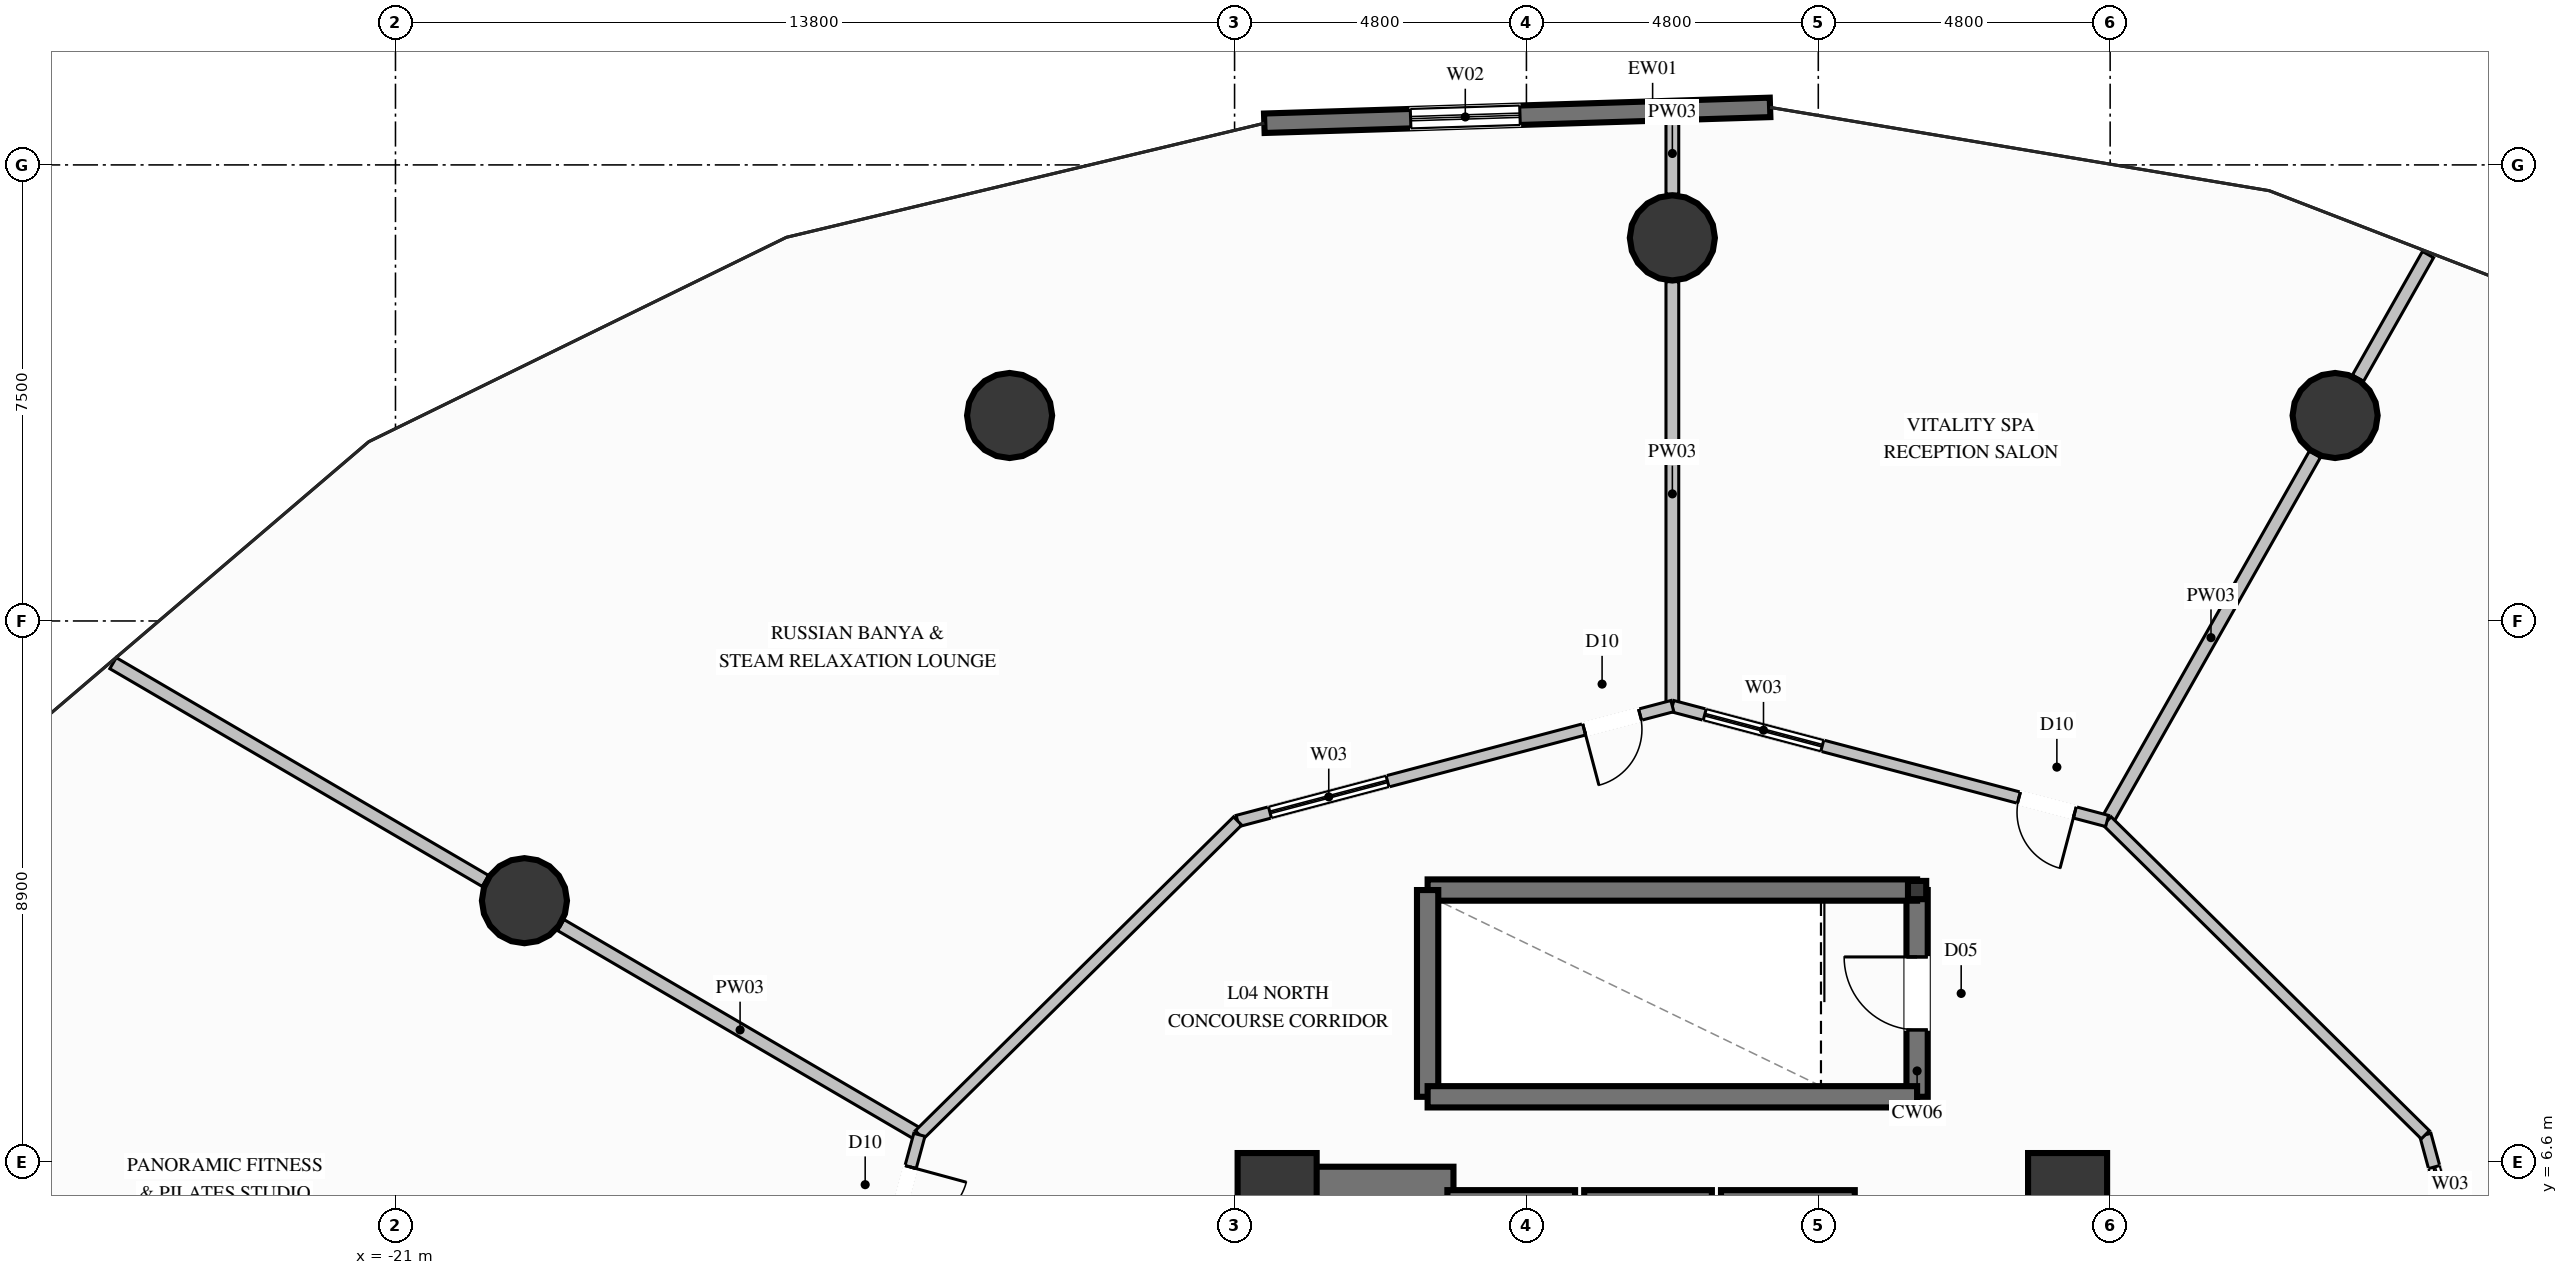
"""IFC4 building model, lengths in metres.
Left out: names, types, materials, properties, quantities, classifications, styles, units other than length and angle.
Written with IfcOpenShell. Run it as: python <this file> out.ifc"""

import sys

from ifc_helpers import new_model, si_unit, direction, frame, frame_2d, origin, origin_2d, place, context, subcontext, project, spatial, rectangle, hollow_rectangle, circle, extrude, element, fill, save


model = new_model("IFC4")
c1 = context("Model", 3, precision=1e-05, world=origin(), true_north=direction((0.0, 1.0)))
c2 = subcontext(c1, "Body", "Model", "MODEL_VIEW")
j1 = project(units=[si_unit("LENGTHUNIT", "METRE"), si_unit("PLANEANGLEUNIT", "RADIAN")], contexts=[c1])
p1 = place(None, origin())
s1 = spatial("IfcSite", under=j1, at=p1, CompositionType="ELEMENT")
p2 = place(p1, origin())
s2 = spatial("IfcBuilding", under=s1, at=p2, CompositionType="ELEMENT")
p3 = place(p2, frame((0.0, 0.0, 23.6)))
s3 = spatial("IfcBuildingStorey", under=s2, at=p3, CompositionType="ELEMENT", Elevation=23.6)
for number, where, z_axis, x_axis in (
    (1, (6.5, 6.1, 0.0), (0.0, 0.0, 1.0), (1.0, 0.0, 0.0)),
    (2, (-6.5, 6.1, 0.0), (0.0, 0.0, 1.0), (1.0, 0.0, 0.0)),
):
    element("IfcColumn", number, at=place(p3, frame(where, z_axis=z_axis, x_axis=x_axis)), inside=s3, PredefinedType="COLUMN", context=c2, shape_type="SweptSolid", body=[
        extrude(rectangle(XDim=1.3, YDim=1.3, at=origin_2d()), origin(), (0.0, 0.0, 1.0), 4.8),
    ])
p4 = place(p3, frame((-6.075, 6.1, 0.0), z_axis=(0.0, 0.0, 1.0), x_axis=(1.0, 0.0, 0.0)))
e3 = element("IfcWall", 3, at=p4, inside=s3, PredefinedType="SHEAR", context=c2, shape_type="SweptSolid", body=[
    extrude(rectangle(XDim=2.475, YDim=0.85, at=frame_2d((1.237, 0.0))), origin(), (0.0, 0.0, 1.0), 4.8),
])
p5 = place(p3, frame((5.85, 6.1, 0.0), z_axis=(0.0, 0.0, 1.0), x_axis=(1.0, 0.0, 0.0)))
e4 = element("IfcWall", 4, at=p5, inside=s3, PredefinedType="SHEAR", context=c2, shape_type="SweptSolid", body=[
    extrude(rectangle(XDim=0.225, YDim=0.85, at=frame_2d((0.112, 0.0))), origin(), (0.0, 0.0, 1.0), 4.8),
])
p6 = place(p3, frame((-6.5, 2.35, 0.0), z_axis=(0.0, 0.0, 1.0), x_axis=(0.0, 1.0, 0.0)))
e5 = element("IfcWall", 5, at=p6, inside=s3, PredefinedType="SHEAR", context=c2, shape_type="SweptSolid", body=[
    extrude(rectangle(XDim=4.175, YDim=0.85, at=frame_2d((2.087, 0.0))), origin(), (0.0, 0.0, 1.0), 4.8),
])
p7 = place(p3, frame((6.5, 3.35, 0.0), z_axis=(0.0, 0.0, 1.0), x_axis=(0.0, 1.0, 0.0)))
e6 = element("IfcWall", 6, at=p7, inside=s3, PredefinedType="SHEAR", context=c2, shape_type="SweptSolid", body=[
    extrude(rectangle(XDim=3.175, YDim=0.85, at=frame_2d((1.587, 0.0))), origin(), (0.0, 0.0, 1.0), 4.8),
])
p8 = place(p3, frame((4.025, 11.075, 0.0), z_axis=(0.0, 0.0, 1.0), x_axis=(1.0, 0.0, 0.0)))
e7 = element("IfcColumn", 7, at=p8, inside=s3, PredefinedType="COLUMN", context=c2, shape_type="SweptSolid", body=[
    extrude(hollow_rectangle(XDim=0.3, YDim=0.3, WallThickness=0.016, at=origin_2d()), origin(), (0.0, 0.0, 1.0), 4.8),
])
for number, where, z_axis, x_axis in (
    (8, (10.9, 18.879, 0.0), (0.0, 0.0, 1.0), (1.0, 0.0, 0.0)),
    (9, (0.0, 21.8, 0.0), (0.0, 0.0, 1.0), (1.0, 0.0, 0.0)),
    (10, (-10.9, 18.879, 0.0), (0.0, 0.0, 1.0), (1.0, 0.0, 0.0)),
    (11, (-18.879, 10.9, 0.0), (0.0, 0.0, 1.0), (1.0, 0.0, 0.0)),
):
    element("IfcColumn", number, at=place(p3, frame(where, z_axis=z_axis, x_axis=x_axis)), inside=s3, PredefinedType="COLUMN", context=c2, shape_type="SweptSolid", body=[
        extrude(circle(Radius=0.7, at=origin_2d()), origin(), (0.0, 0.0, 1.0), 4.8),
    ])
p9 = place(p3, frame((-6.711, 23.685, 0.0), z_axis=(0.0, 0.0, 1.0), x_axis=(0.999508118347, 0.031361144071, 0.0)))
e12 = element("IfcWall", 12, at=p9, inside=s3, PredefinedType="SOLIDWALL", context=c2, shape_type="SweptSolid", body=[
    extrude(rectangle(XDim=8.322, YDim=0.32, at=frame_2d((4.161, 0.0))), origin(), (0.0, 0.0, 1.0), 4.54),
])
p10 = place(p9, frame((2.407, 0.0, 0.65)))
e13 = element("IfcOpeningElement", 13, at=p10, cuts=e12, PredefinedType="OPENING", context=c2, shape_type="SweptSolid", body=[
    extrude(rectangle(XDim=1.8, YDim=2.6, at=frame_2d((0.9, 1.3))), frame((0.0, 0.17, 0.0), z_axis=(0.0, -1.0, 0.0), x_axis=(1.0, 0.0, 0.0)), (0.0, 0.0, 1.0), 0.34),
])
for number, where, z_axis, x_axis in (
    (14, (-1.6, 6.0, 0.0), (0.0, 0.0, 1.0), (-1.0, 0.0, 0.0)),
    (15, (0.65, 6.0, 0.0), (0.0, 0.0, 1.0), (-1.0, 0.0, 0.0)),
):
    element("IfcWall", number, at=place(p3, frame(where, z_axis=z_axis, x_axis=x_axis)), inside=s3, PredefinedType="SOLIDWALL", context=c2, shape_type="SweptSolid", body=[
        extrude(rectangle(XDim=2.1, YDim=0.28, at=frame_2d((1.05, 0.0))), origin(), (0.0, 0.0, 1.0), 4.54),
    ])
p11 = place(p3, frame((3.0, 6.0, 0.0), z_axis=(0.0, 0.0, 1.0), x_axis=(-1.0, 0.0, 0.0)))
e16 = element("IfcWall", 16, at=p11, inside=s3, PredefinedType="SOLIDWALL", context=c2, shape_type="SweptSolid", body=[
    extrude(rectangle(XDim=2.2, YDim=0.28, at=frame_2d((1.1, 0.0))), origin(), (0.0, 0.0, 1.0), 4.54),
])
p12 = place(p3, frame((4.025, 7.675, 0.0), z_axis=(0.0, 0.0, 1.0), x_axis=(0.0, 1.0, 0.0)))
e17 = element("IfcWall", 17, at=p12, inside=s3, PredefinedType="SOLIDWALL", context=c2, shape_type="SweptSolid", body=[
    extrude(rectangle(XDim=3.4, YDim=0.35, at=frame_2d((1.7, 0.0))), origin(), (0.0, 0.0, 1.0), 4.54),
])
p13 = place(p12, frame((1.1, 0.0, 0.0)))
e18 = element("IfcOpeningElement", 18, at=p13, cuts=e17, PredefinedType="OPENING", context=c2, shape_type="SweptSolid", body=[
    extrude(rectangle(XDim=1.2, YDim=2.2, at=frame_2d((0.6, 1.1))), frame((0.0, 0.185, 0.0), z_axis=(0.0, -1.0, 0.0), x_axis=(1.0, 0.0, 0.0)), (0.0, 0.0, 1.0), 0.37),
])
p14 = place(p3, frame((4.025, 11.075, 0.0), z_axis=(0.0, 0.0, 1.0), x_axis=(-1.0, 0.0, 0.0)))
e19 = element("IfcWall", 19, at=p14, inside=s3, PredefinedType="SOLIDWALL", context=c2, shape_type="SweptSolid", body=[
    extrude(rectangle(XDim=8.05, YDim=0.35, at=frame_2d((4.025, 0.0))), origin(), (0.0, 0.0, 1.0), 4.54),
])
p15 = place(p3, frame((-4.025, 11.075, 0.0), z_axis=(0.0, 0.0, 1.0), x_axis=(0.0, -1.0, 0.0)))
e20 = element("IfcWall", 20, at=p15, inside=s3, PredefinedType="SOLIDWALL", context=c2, shape_type="SweptSolid", body=[
    extrude(rectangle(XDim=3.4, YDim=0.35, at=frame_2d((1.7, 0.0))), origin(), (0.0, 0.0, 1.0), 4.54),
])
p16 = place(p3, frame((-4.025, 7.675, 0.0), z_axis=(0.0, 0.0, 1.0), x_axis=(1.0, 0.0, 0.0)))
e21 = element("IfcWall", 21, at=p16, inside=s3, PredefinedType="SOLIDWALL", context=c2, shape_type="SweptSolid", body=[
    extrude(rectangle(XDim=8.05, YDim=0.35, at=frame_2d((4.025, 0.0))), origin(), (0.0, 0.0, 1.0), 4.54),
])
p17 = place(p3, frame((7.15, 12.211, 0.0), z_axis=(0.0, 0.0, 1.0), x_axis=(0.493009905658, 0.87002369676, 0.0)))
e22 = element("IfcWall", 22, at=p17, inside=s3, PredefinedType="PARTITIONING", context=c2, shape_type="SweptSolid", body=[
    extrude(rectangle(XDim=6.931, YDim=0.21, at=frame_2d((3.465, 0.0))), origin(), (0.0, 0.0, 1.0), 2.725),
])
p18 = place(p3, frame((11.276, 19.493, 0.0), z_axis=(0.0, 0.0, 1.0), x_axis=(0.493041569547, 0.870005753256, 0.0)))
e23 = element("IfcWall", 23, at=p18, inside=s3, PredefinedType="PARTITIONING", context=c2, shape_type="SweptSolid", body=[
    extrude(rectangle(XDim=2.337, YDim=0.21, at=frame_2d((1.168, 0.0))), origin(), (0.0, 0.0, 1.0), 4.54),
])
p19 = place(p3, frame((0.0, 14.1, 0.0), z_axis=(0.0, 0.0, 1.0), x_axis=(0.0, 1.0, 0.0)))
e24 = element("IfcWall", 24, at=p19, inside=s3, PredefinedType="PARTITIONING", context=c2, shape_type="SweptSolid", body=[
    extrude(rectangle(XDim=6.98, YDim=0.21, at=frame_2d((3.49, 0.0))), origin(), (0.0, 0.0, 1.0), 2.725),
])
p20 = place(p3, frame((0.0, 22.52, 0.0), z_axis=(0.0, 0.0, 1.0), x_axis=(0.0, 1.0, 0.0)))
e25 = element("IfcWall", 25, at=p20, inside=s3, PredefinedType="PARTITIONING", context=c2, shape_type="SweptSolid", body=[
    extrude(rectangle(XDim=1.336, YDim=0.21, at=frame_2d((0.668, 0.0))), origin(), (0.0, 0.0, 1.0), 4.54),
])
p21 = place(p3, frame((-12.384, 7.05, 0.0), z_axis=(0.0, 0.0, 1.0), x_axis=(-0.863200238908, 0.504861711313, 0.0)))
e26 = element("IfcWall", 26, at=p21, inside=s3, PredefinedType="PARTITIONING", context=c2, shape_type="SweptSolid", body=[
    extrude(rectangle(XDim=6.832, YDim=0.21, at=frame_2d((3.416, 0.0))), origin(), (0.0, 0.0, 1.0), 2.725),
])
p22 = place(p3, frame((-19.522, 11.225, 0.0), z_axis=(0.0, 0.0, 1.0), x_axis=(-0.863224110389, 0.504820894222, 0.0)))
e27 = element("IfcWall", 27, at=p22, inside=s3, PredefinedType="PARTITIONING", context=c2, shape_type="SweptSolid", body=[
    extrude(rectangle(XDim=7.093, YDim=0.21, at=frame_2d((3.547, 0.0))), origin(), (0.0, 0.0, 1.0), 4.54),
])
p23 = place(p3, frame((14.3, 0.0, 0.0), z_axis=(0.0, 0.0, 1.0), x_axis=(-0.262260528785, 0.964997106235, 0.0)))
e28 = element("IfcWall", 28, at=p23, inside=s3, PredefinedType="PARTITIONING", context=c2, shape_type="SweptSolid", body=[
    extrude(rectangle(XDim=7.306, YDim=0.19, at=frame_2d((3.653, 0.0))), origin(), (0.0, 0.0, 1.0), 4.54),
])
p24 = place(p23, frame((0.55, 0.0, 0.0)))
e29 = element("IfcOpeningElement", 29, at=p24, cuts=e28, PredefinedType="OPENING", context=c2, shape_type="SweptSolid", body=[
    extrude(rectangle(XDim=0.95, YDim=2.1, at=frame_2d((0.475, 1.05))), frame((0.0, 0.105, 0.0), z_axis=(0.0, -1.0, 0.0), x_axis=(1.0, 0.0, 0.0)), (0.0, 0.0, 1.0), 0.21),
])
p25 = place(p23, frame((4.756, 0.0, 0.9)))
e30 = element("IfcOpeningElement", 30, at=p25, cuts=e28, PredefinedType="OPENING", context=c2, shape_type="SweptSolid", body=[
    extrude(rectangle(XDim=2.0, YDim=1.6, at=frame_2d((1.0, 0.8))), frame((0.0, 0.105, 0.0), z_axis=(0.0, -1.0, 0.0), x_axis=(1.0, 0.0, 0.0)), (0.0, 0.0, 1.0), 0.21),
])
p26 = place(p3, frame((12.384, 7.05, 0.0), z_axis=(0.0, 0.0, 1.0), x_axis=(-0.712071304345, 0.702107155303, 0.0)))
e31 = element("IfcWall", 31, at=p26, inside=s3, PredefinedType="PARTITIONING", context=c2, shape_type="SweptSolid", body=[
    extrude(rectangle(XDim=7.351, YDim=0.19, at=frame_2d((3.675, 0.0))), origin(), (0.0, 0.0, 1.0), 4.54),
])
p27 = place(p3, frame((7.15, 12.211, 0.0), z_axis=(0.0, 0.0, 1.0), x_axis=(-0.966820901533, 0.255455170937, 0.0)))
e32 = element("IfcWall", 32, at=p27, inside=s3, PredefinedType="PARTITIONING", context=c2, shape_type="SweptSolid", body=[
    extrude(rectangle(XDim=7.395, YDim=0.19, at=frame_2d((3.698, 0.0))), origin(), (0.0, 0.0, 1.0), 4.54),
])
p28 = place(p27, frame((0.55, 0.0, 0.0)))
e33 = element("IfcOpeningElement", 33, at=p28, cuts=e32, PredefinedType="OPENING", context=c2, shape_type="SweptSolid", body=[
    extrude(rectangle(XDim=0.95, YDim=2.1, at=frame_2d((0.475, 1.05))), frame((0.0, 0.105, 0.0), z_axis=(0.0, -1.0, 0.0), x_axis=(1.0, 0.0, 0.0)), (0.0, 0.0, 1.0), 0.21),
])
p29 = place(p27, frame((4.845, 0.0, 0.9)))
e34 = element("IfcOpeningElement", 34, at=p29, cuts=e32, PredefinedType="OPENING", context=c2, shape_type="SweptSolid", body=[
    extrude(rectangle(XDim=2.0, YDim=1.6, at=frame_2d((1.0, 0.8))), frame((0.0, 0.105, 0.0), z_axis=(0.0, -1.0, 0.0), x_axis=(1.0, 0.0, 0.0)), (0.0, 0.0, 1.0), 0.21),
])
p30 = place(p3, frame((0.0, 14.1, 0.0), z_axis=(0.0, 0.0, 1.0), x_axis=(-0.966820901533, -0.255455170937, 0.0)))
e35 = element("IfcWall", 35, at=p30, inside=s3, PredefinedType="PARTITIONING", context=c2, shape_type="SweptSolid", body=[
    extrude(rectangle(XDim=7.395, YDim=0.19, at=frame_2d((3.698, 0.0))), origin(), (0.0, 0.0, 1.0), 4.54),
])
p31 = place(p30, frame((0.55, 0.0, 0.0)))
e36 = element("IfcOpeningElement", 36, at=p31, cuts=e35, PredefinedType="OPENING", context=c2, shape_type="SweptSolid", body=[
    extrude(rectangle(XDim=0.95, YDim=2.1, at=frame_2d((0.475, 1.05))), frame((0.0, 0.105, 0.0), z_axis=(0.0, -1.0, 0.0), x_axis=(1.0, 0.0, 0.0)), (0.0, 0.0, 1.0), 0.21),
])
p32 = place(p30, frame((4.845, 0.0, 0.9)))
e37 = element("IfcOpeningElement", 37, at=p32, cuts=e35, PredefinedType="OPENING", context=c2, shape_type="SweptSolid", body=[
    extrude(rectangle(XDim=2.0, YDim=1.6, at=frame_2d((1.0, 0.8))), frame((0.0, 0.105, 0.0), z_axis=(0.0, -1.0, 0.0), x_axis=(1.0, 0.0, 0.0)), (0.0, 0.0, 1.0), 0.21),
])
p33 = place(p3, frame((-7.15, 12.211, 0.0), z_axis=(0.0, 0.0, 1.0), x_axis=(-0.712071304345, -0.702107155303, 0.0)))
e38 = element("IfcWall", 38, at=p33, inside=s3, PredefinedType="PARTITIONING", context=c2, shape_type="SweptSolid", body=[
    extrude(rectangle(XDim=7.351, YDim=0.19, at=frame_2d((3.675, 0.0))), origin(), (0.0, 0.0, 1.0), 4.54),
])
p34 = place(p3, frame((-12.384, 7.05, 0.0), z_axis=(0.0, 0.0, 1.0), x_axis=(-0.262260528785, -0.964997106235, 0.0)))
e39 = element("IfcWall", 39, at=p34, inside=s3, PredefinedType="PARTITIONING", context=c2, shape_type="SweptSolid", body=[
    extrude(rectangle(XDim=7.306, YDim=0.19, at=frame_2d((3.653, 0.0))), origin(), (0.0, 0.0, 1.0), 4.54),
])
p35 = place(p34, frame((0.55, 0.0, 0.0)))
e40 = element("IfcOpeningElement", 40, at=p35, cuts=e39, PredefinedType="OPENING", context=c2, shape_type="SweptSolid", body=[
    extrude(rectangle(XDim=0.95, YDim=2.1, at=frame_2d((0.475, 1.05))), frame((0.0, 0.105, 0.0), z_axis=(0.0, -1.0, 0.0), x_axis=(1.0, 0.0, 0.0)), (0.0, 0.0, 1.0), 0.21),
])
p36 = place(p34, frame((4.756, 0.0, 0.9)))
e41 = element("IfcOpeningElement", 41, at=p36, cuts=e39, PredefinedType="OPENING", context=c2, shape_type="SweptSolid", body=[
    extrude(rectangle(XDim=2.0, YDim=1.6, at=frame_2d((1.0, 0.8))), frame((0.0, 0.105, 0.0), z_axis=(0.0, -1.0, 0.0), x_axis=(1.0, 0.0, 0.0)), (0.0, 0.0, 1.0), 0.21),
])
p37 = place(p10, origin())
e42 = element("IfcWindow", 42, at=p37, inside=s3, PartitioningType="SINGLE_PANEL", PredefinedType="WINDOW", context=c2, shape_type="SweptSolid", body=[
    extrude(rectangle(XDim=1.8, YDim=2.6, at=frame_2d((0.9, 1.3))), frame((0.0, 0.03, 0.0), z_axis=(0.0, -1.0, 0.0), x_axis=(1.0, 0.0, 0.0)), (0.0, 0.0, 1.0), 0.06),
])
fill(e13, e42)
p38 = place(p13, origin())
e43 = element("IfcDoor", 43, at=p38, inside=s3, OperationType="SINGLE_SWING_RIGHT", PredefinedType="DOOR", context=c2, shape_type="SweptSolid", body=[
    extrude(rectangle(XDim=1.2, YDim=2.2, at=frame_2d((0.6, 1.1))), frame((0.0, 0.025, 0.0), z_axis=(0.0, -1.0, 0.0), x_axis=(1.0, 0.0, 0.0)), (0.0, 0.0, 1.0), 0.05),
])
fill(e18, e43)
p39 = place(p25, origin())
e44 = element("IfcWindow", 44, at=p39, inside=s3, PartitioningType="SINGLE_PANEL", PredefinedType="WINDOW", context=c2, shape_type="SweptSolid", body=[
    extrude(rectangle(XDim=2.0, YDim=1.6, at=frame_2d((1.0, 0.8))), frame((0.0, 0.03, 0.0), z_axis=(0.0, -1.0, 0.0), x_axis=(1.0, 0.0, 0.0)), (0.0, 0.0, 1.0), 0.06),
])
fill(e30, e44)
p40 = place(p28, origin())
e45 = element("IfcDoor", 45, at=p40, inside=s3, OperationType="SINGLE_SWING_LEFT", PredefinedType="DOOR", context=c2, shape_type="SweptSolid", body=[
    extrude(rectangle(XDim=0.95, YDim=2.1, at=frame_2d((0.475, 1.05))), frame((0.0, 0.025, 0.0), z_axis=(0.0, -1.0, 0.0), x_axis=(1.0, 0.0, 0.0)), (0.0, 0.0, 1.0), 0.05),
])
fill(e33, e45)
p41 = place(p29, origin())
e46 = element("IfcWindow", 46, at=p41, inside=s3, PartitioningType="SINGLE_PANEL", PredefinedType="WINDOW", context=c2, shape_type="SweptSolid", body=[
    extrude(rectangle(XDim=2.0, YDim=1.6, at=frame_2d((1.0, 0.8))), frame((0.0, 0.03, 0.0), z_axis=(0.0, -1.0, 0.0), x_axis=(1.0, 0.0, 0.0)), (0.0, 0.0, 1.0), 0.06),
])
fill(e34, e46)
p42 = place(p31, origin())
e47 = element("IfcDoor", 47, at=p42, inside=s3, OperationType="SINGLE_SWING_RIGHT", PredefinedType="DOOR", context=c2, shape_type="SweptSolid", body=[
    extrude(rectangle(XDim=0.95, YDim=2.1, at=frame_2d((0.475, 1.05))), frame((0.0, 0.025, 0.0), z_axis=(0.0, -1.0, 0.0), x_axis=(1.0, 0.0, 0.0)), (0.0, 0.0, 1.0), 0.05),
])
fill(e36, e47)
p43 = place(p32, origin())
e48 = element("IfcWindow", 48, at=p43, inside=s3, PartitioningType="SINGLE_PANEL", PredefinedType="WINDOW", context=c2, shape_type="SweptSolid", body=[
    extrude(rectangle(XDim=2.0, YDim=1.6, at=frame_2d((1.0, 0.8))), frame((0.0, 0.03, 0.0), z_axis=(0.0, -1.0, 0.0), x_axis=(1.0, 0.0, 0.0)), (0.0, 0.0, 1.0), 0.06),
])
fill(e37, e48)
p44 = place(p35, origin())
e49 = element("IfcDoor", 49, at=p44, inside=s3, OperationType="SINGLE_SWING_LEFT", PredefinedType="DOOR", context=c2, shape_type="SweptSolid", body=[
    extrude(rectangle(XDim=0.95, YDim=2.1, at=frame_2d((0.475, 1.05))), frame((0.0, 0.025, 0.0), z_axis=(0.0, -1.0, 0.0), x_axis=(1.0, 0.0, 0.0)), (0.0, 0.0, 1.0), 0.05),
])
fill(e40, e49)
save(model, sys.argv[1])
